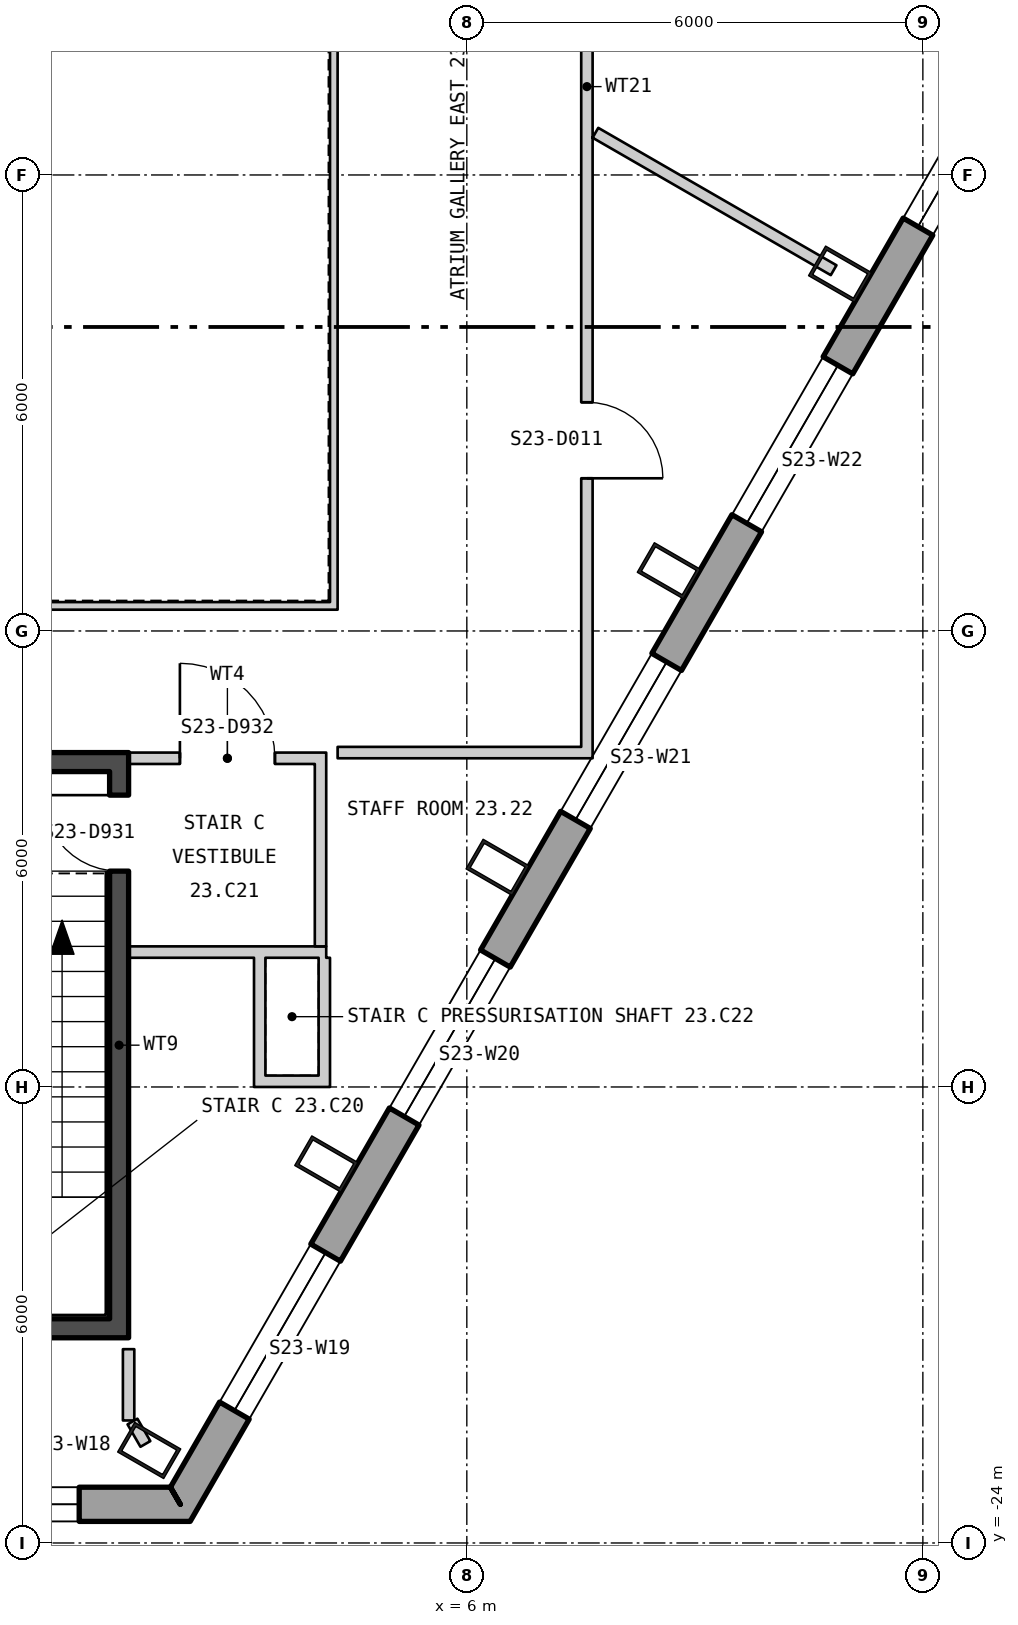
"""IFC4 building model, lengths in metres.
Left out: names, types, materials, properties, quantities, classifications, styles, units other than length and angle.
Written with IfcOpenShell. Run it as: python <this file> out.ifc"""

import sys

from ifc_helpers import new_model, si_unit, direction, frame, frame_2d, origin, origin_2d, place, context, subcontext, project, spatial, polyline, rectangle, hollow_rectangle, outline, extrude, element, fill, save


model = new_model("IFC4")
c1 = context("Model", 3, precision=1e-05, world=origin(), true_north=direction((0.0, 1.0)))
c2 = subcontext(c1, "Body", "Model", "MODEL_VIEW")
j1 = project(units=[si_unit("LENGTHUNIT", "METRE"), si_unit("PLANEANGLEUNIT", "RADIAN")], contexts=[c1])
p1 = place(None, origin())
s1 = spatial("IfcSite", under=j1, at=p1, CompositionType="ELEMENT")
p2 = place(p1, origin())
s2 = spatial("IfcBuilding", under=s1, at=p2, CompositionType="ELEMENT")
p3 = place(p2, frame((0.0, 0.0, 304.2)))
s3 = spatial("IfcBuildingStorey", under=s2, at=p3, CompositionType="ELEMENT", Elevation=304.2)
for number, where, z_axis, x_axis in (
    (1, (1.821, -22.783, 0.0), (0.0, 0.0, 1.0), (0.5, 0.866, 0.0)),
    (2, (4.151, -19.013, 0.0), (0.0, 0.0, 1.0), (0.5, 0.866, 0.0)),
    (3, (6.405, -15.11, 0.0), (0.0, 0.0, 1.0), (0.5, 0.866, 0.0)),
    (4, (8.658, -11.208, 0.0), (0.0, 0.0, 1.0), (0.5, 0.866, 0.0)),
    (5, (10.911, -7.305, 0.0), (0.0, 0.0, 1.0), (0.5, 0.866, 0.0)),
):
    element("IfcColumn", number, at=place(p3, frame(where, z_axis=z_axis, x_axis=x_axis)), inside=s3, PredefinedType="COLUMN", context=c2, shape_type="SweptSolid", body=[
        extrude(hollow_rectangle(XDim=0.45, YDim=0.7, WallThickness=0.04, at=origin_2d()), origin(), (0.0, 0.0, 1.0), 4.2),
    ])
p4 = place(p3, frame((-2.23, -23.491, -0.18), z_axis=(0.0, 0.0, 1.0), x_axis=(1.0, 0.0, 0.0)))
e6 = element("IfcWall", 6, at=p4, inside=s3, PredefinedType="SOLIDWALL", context=c2, shape_type="SweptSolid", body=[
    extrude(outline(polyline([(-0.13, -0.225), (4.59, -0.225), (4.33, 0.225), (0.13, 0.225), (-0.13, -0.225)])), origin(), (0.0, 0.0, 1.0), 3.98),
])
p5 = place(p4, frame((1.33, 0.0, 1.08)))
e7 = element("IfcOpeningElement", 7, at=p5, cuts=e6, PredefinedType="OPENING", context=c2, shape_type="SweptSolid", body=[
    extrude(rectangle(XDim=1.8, YDim=2.3, at=frame_2d((0.9, 1.15))), frame((0.0, 0.235, 0.0), z_axis=(0.0, -1.0, 0.0), x_axis=(1.0, 0.0, 0.0)), (0.0, 0.0, 1.0), 0.47),
])
p6 = place(p3, frame((2.23, -23.491, -0.18), z_axis=(0.0, 0.0, 1.0), x_axis=(0.500000141277, 0.866025322218, 0.0)))
e8 = element("IfcWall", 8, at=p6, inside=s3, PredefinedType="SOLIDWALL", context=c2, shape_type="SweptSolid", body=[
    extrude(outline(polyline([(-0.13, -0.225), (45.86, -0.225), (45.6, 0.225), (0.13, 0.225), (-0.13, -0.225)])), origin(), (0.0, 0.0, 1.0), 3.98),
])
p7 = place(p6, frame((1.424, 0.0, 1.08)))
e9 = element("IfcOpeningElement", 9, at=p7, cuts=e8, PredefinedType="OPENING", context=c2, shape_type="SweptSolid", body=[
    extrude(rectangle(XDim=2.4, YDim=2.3, at=frame_2d((1.2, 1.15))), frame((0.0, 0.235, 0.0), z_axis=(0.0, -1.0, 0.0), x_axis=(1.0, 0.0, 0.0)), (0.0, 0.0, 1.0), 0.47),
])
p8 = place(p6, frame((5.892, 0.0, 1.08)))
e10 = element("IfcOpeningElement", 10, at=p8, cuts=e8, PredefinedType="OPENING", context=c2, shape_type="SweptSolid", body=[
    extrude(rectangle(XDim=2.4, YDim=2.3, at=frame_2d((1.2, 1.15))), frame((0.0, 0.235, 0.0), z_axis=(0.0, -1.0, 0.0), x_axis=(1.0, 0.0, 0.0)), (0.0, 0.0, 1.0), 0.47),
])
p9 = place(p6, frame((10.399, 0.0, 1.08)))
e11 = element("IfcOpeningElement", 11, at=p9, cuts=e8, PredefinedType="OPENING", context=c2, shape_type="SweptSolid", body=[
    extrude(rectangle(XDim=2.4, YDim=2.3, at=frame_2d((1.2, 1.15))), frame((0.0, 0.235, 0.0), z_axis=(0.0, -1.0, 0.0), x_axis=(1.0, 0.0, 0.0)), (0.0, 0.0, 1.0), 0.47),
])
p10 = place(p6, frame((14.905, 0.0, 1.08)))
e12 = element("IfcOpeningElement", 12, at=p10, cuts=e8, PredefinedType="OPENING", context=c2, shape_type="SweptSolid", body=[
    extrude(rectangle(XDim=2.4, YDim=2.3, at=frame_2d((1.2, 1.15))), frame((0.0, 0.235, 0.0), z_axis=(0.0, -1.0, 0.0), x_axis=(1.0, 0.0, 0.0)), (0.0, 0.0, 1.0), 0.47),
])
p11 = place(p6, frame((19.412, 0.0, 1.08)))
e13 = element("IfcOpeningElement", 13, at=p11, cuts=e8, PredefinedType="OPENING", context=c2, shape_type="SweptSolid", body=[
    extrude(rectangle(XDim=2.4, YDim=2.3, at=frame_2d((1.2, 1.15))), frame((0.0, 0.235, 0.0), z_axis=(0.0, -1.0, 0.0), x_axis=(1.0, 0.0, 0.0)), (0.0, 0.0, 1.0), 0.47),
])
p12 = place(p6, frame((23.918, 0.0, 1.08)))
e14 = element("IfcOpeningElement", 14, at=p12, cuts=e8, PredefinedType="OPENING", context=c2, shape_type="SweptSolid", body=[
    extrude(rectangle(XDim=2.4, YDim=2.3, at=frame_2d((1.2, 1.15))), frame((0.0, 0.235, 0.0), z_axis=(0.0, -1.0, 0.0), x_axis=(1.0, 0.0, 0.0)), (0.0, 0.0, 1.0), 0.47),
])
p13 = place(p6, frame((28.425, 0.0, 1.08)))
e15 = element("IfcOpeningElement", 15, at=p13, cuts=e8, PredefinedType="OPENING", context=c2, shape_type="SweptSolid", body=[
    extrude(rectangle(XDim=2.4, YDim=2.3, at=frame_2d((1.2, 1.15))), frame((0.0, 0.235, 0.0), z_axis=(0.0, -1.0, 0.0), x_axis=(1.0, 0.0, 0.0)), (0.0, 0.0, 1.0), 0.47),
])
p14 = place(p6, frame((32.932, 0.0, 1.08)))
e16 = element("IfcOpeningElement", 16, at=p14, cuts=e8, PredefinedType="OPENING", context=c2, shape_type="SweptSolid", body=[
    extrude(rectangle(XDim=2.4, YDim=2.3, at=frame_2d((1.2, 1.15))), frame((0.0, 0.235, 0.0), z_axis=(0.0, -1.0, 0.0), x_axis=(1.0, 0.0, 0.0)), (0.0, 0.0, 1.0), 0.47),
])
p15 = place(p6, frame((37.438, 0.0, 1.08)))
e17 = element("IfcOpeningElement", 17, at=p15, cuts=e8, PredefinedType="OPENING", context=c2, shape_type="SweptSolid", body=[
    extrude(rectangle(XDim=2.4, YDim=2.3, at=frame_2d((1.2, 1.15))), frame((0.0, 0.235, 0.0), z_axis=(0.0, -1.0, 0.0), x_axis=(1.0, 0.0, 0.0)), (0.0, 0.0, 1.0), 0.47),
])
p16 = place(p6, frame((41.907, 0.0, 1.08)))
e18 = element("IfcOpeningElement", 18, at=p16, cuts=e8, PredefinedType="OPENING", context=c2, shape_type="SweptSolid", body=[
    extrude(rectangle(XDim=2.4, YDim=2.3, at=frame_2d((1.2, 1.15))), frame((0.0, 0.235, 0.0), z_axis=(0.0, -1.0, 0.0), x_axis=(1.0, 0.0, 0.0)), (0.0, 0.0, 1.0), 0.47),
])
p17 = place(p3, frame((-4.3, -11.67, 0.0), z_axis=(0.0, 0.0, 1.0), x_axis=(1.0, 0.0, 0.0)))
e19 = element("IfcWall", 19, at=p17, inside=s3, PredefinedType="PARTITIONING", context=c2, shape_type="SweptSolid", body=[
    extrude(rectangle(XDim=8.6, YDim=0.1, at=frame_2d((4.3, 0.0))), origin(), (0.0, 0.0, 1.0), 4.0),
])
p18 = place(p3, frame((4.25, -11.62, 0.0), z_axis=(0.0, 0.0, 1.0), x_axis=(0.0, 1.0, 0.0)))
e20 = element("IfcWall", 20, at=p18, inside=s3, PredefinedType="PARTITIONING", context=c2, shape_type="SweptSolid", body=[
    extrude(rectangle(XDim=8.04, YDim=0.1, at=frame_2d((4.02, 0.0))), origin(), (0.0, 0.0, 1.0), 4.0),
])
p19 = place(p3, frame((1.425, -21.05, 0.0), z_axis=(0.0, 0.0, 1.0), x_axis=(0.0, 1.0, 0.0)))
e21 = element("IfcWall", 21, at=p19, inside=s3, PredefinedType="SHEAR", context=c2, shape_type="SweptSolid", body=[
    extrude(rectangle(XDim=7.2, YDim=0.25, at=frame_2d((3.6, 0.0))), origin(), (0.0, 0.0, 1.0), 4.0),
])
p20 = place(p19, frame((5.89, 0.0, 0.0)))
e22 = element("IfcOpeningElement", 22, at=p20, cuts=e21, PredefinedType="OPENING", context=c2, shape_type="SweptSolid", body=[
    extrude(rectangle(XDim=1.0, YDim=2.1, at=frame_2d((0.5, 1.05))), frame((0.0, 0.135, 0.0), z_axis=(0.0, -1.0, 0.0), x_axis=(1.0, 0.0, 0.0)), (0.0, 0.0, 1.0), 0.27),
])
for number, where, z_axis, x_axis in (
    (23, (-1.55, -21.175, 0.0), (0.0, 0.0, 1.0), (1.0, 0.0, 0.0)),
    (24, (-1.55, -13.725, 0.0), (0.0, 0.0, 1.0), (1.0, 0.0, 0.0)),
):
    element("IfcWall", number, at=place(p3, frame(where, z_axis=z_axis, x_axis=x_axis)), inside=s3, PredefinedType="SHEAR", context=c2, shape_type="SweptSolid", body=[
        extrude(rectangle(XDim=3.1, YDim=0.25, at=frame_2d((1.55, 0.0))), origin(), (0.0, 0.0, 1.0), 4.0),
    ])
p21 = place(p3, frame((1.55, -16.225, 0.0), z_axis=(0.0, 0.0, 1.0), x_axis=(1.0, 0.0, 0.0)))
e25 = element("IfcWall", 25, at=p21, inside=s3, PredefinedType="PARTITIONING", context=c2, shape_type="SweptSolid", body=[
    extrude(rectangle(XDim=2.6, YDim=0.15, at=frame_2d((1.3, 0.0))), origin(), (0.0, 0.0, 1.0), 4.0),
])
p22 = place(p3, frame((4.075, -16.15, 0.0), z_axis=(0.0, 0.0, 1.0), x_axis=(0.0, 1.0, 0.0)))
e26 = element("IfcWall", 26, at=p22, inside=s3, PredefinedType="PARTITIONING", context=c2, shape_type="SweptSolid", body=[
    extrude(rectangle(XDim=2.4, YDim=0.15, at=frame_2d((1.2, 0.0))), origin(), (0.0, 0.0, 1.0), 4.0),
])
p23 = place(p3, frame((1.55, -13.675, 0.0), z_axis=(0.0, 0.0, 1.0), x_axis=(1.0, 0.0, 0.0)))
e27 = element("IfcWall", 27, at=p23, inside=s3, PredefinedType="PARTITIONING", context=c2, shape_type="SweptSolid", body=[
    extrude(rectangle(XDim=2.6, YDim=0.15, at=frame_2d((1.3, 0.0))), origin(), (0.0, 0.0, 1.0), 3.186),
])
p24 = place(p23, frame((0.675, 0.0, 0.0)))
e28 = element("IfcOpeningElement", 28, at=p24, cuts=e27, PredefinedType="OPENING", context=c2, shape_type="SweptSolid", body=[
    extrude(rectangle(XDim=1.25, YDim=2.1, at=frame_2d((0.625, 1.05))), frame((0.0, 0.085, 0.0), z_axis=(0.0, -1.0, 0.0), x_axis=(1.0, 0.0, 0.0)), (0.0, 0.0, 1.0), 0.17),
])
p25 = place(p3, frame((3.275, -18.0, 0.0), z_axis=(0.0, 0.0, 1.0), x_axis=(0.0, 1.0, 0.0)))
e29 = element("IfcWall", 29, at=p25, inside=s3, PredefinedType="PARTITIONING", context=c2, shape_type="SweptSolid", body=[
    extrude(rectangle(XDim=1.7, YDim=0.15, at=frame_2d((0.85, 0.0))), origin(), (0.0, 0.0, 1.0), 3.55),
])
p26 = place(p3, frame((3.35, -17.925, 0.0), z_axis=(0.0, 0.0, 1.0), x_axis=(1.0, 0.0, 0.0)))
e30 = element("IfcWall", 30, at=p26, inside=s3, PredefinedType="PARTITIONING", context=c2, shape_type="SweptSolid", body=[
    extrude(rectangle(XDim=0.7, YDim=0.15, at=frame_2d((0.35, 0.0))), origin(), (0.0, 0.0, 1.0), 4.0),
])
p27 = place(p3, frame((4.125, -18.0, 0.0), z_axis=(0.0, 0.0, 1.0), x_axis=(0.0, 1.0, 0.0)))
e31 = element("IfcWall", 31, at=p27, inside=s3, PredefinedType="PARTITIONING", context=c2, shape_type="SweptSolid", body=[
    extrude(rectangle(XDim=1.7, YDim=0.15, at=frame_2d((0.85, 0.0))), origin(), (0.0, 0.0, 1.0), 4.0),
])
p28 = place(p3, frame((1.55, -22.388, 0.0), z_axis=(0.0, 0.0, 1.0), x_axis=(0.0, 1.0, 0.0)))
e32 = element("IfcWall", 32, at=p28, inside=s3, PredefinedType="PARTITIONING", context=c2, shape_type="SweptSolid", body=[
    extrude(rectangle(XDim=0.938, YDim=0.15, at=frame_2d((0.469, 0.0))), origin(), (0.0, 0.0, 1.0), 4.0),
])
p29 = place(p3, frame((1.601, -22.402, 0.0), z_axis=(0.0, 0.0, 1.0), x_axis=(0.499298623879, -0.866429964967, 0.0)))
e33 = element("IfcWall", 33, at=p29, inside=s3, PredefinedType="PARTITIONING", context=c2, shape_type="SweptSolid", body=[
    extrude(rectangle(XDim=0.341, YDim=0.15, at=frame_2d((0.17, 0.0))), origin(), (0.0, 0.0, 1.0), 4.0),
])
p30 = place(p3, frame((4.3, -13.6, 0.0), z_axis=(0.0, 0.0, 1.0), x_axis=(1.0, 0.0, 0.0)))
e34 = element("IfcWall", 34, at=p30, inside=s3, PredefinedType="PARTITIONING", context=c2, shape_type="SweptSolid", body=[
    extrude(rectangle(XDim=2.775, YDim=0.15, at=frame_2d((1.387, 0.0))), origin(), (0.0, 0.0, 1.0), 3.186),
])
p31 = place(p3, frame((7.075, -13.6, 0.0), z_axis=(0.0, 0.0, 1.0), x_axis=(1.0, 0.0, 0.0)))
e35 = element("IfcWall", 35, at=p31, inside=s3, PredefinedType="PARTITIONING", context=c2, shape_type="SweptSolid", body=[
    extrude(rectangle(XDim=0.43, YDim=0.15, at=frame_2d((0.215, 0.0))), origin(), (0.0, 0.0, 1.0), 4.0),
])
p32 = place(p3, frame((7.58, -13.675, 0.0), z_axis=(0.0, 0.0, 1.0), x_axis=(0.0, 1.0, 0.0)))
e36 = element("IfcWall", 36, at=p32, inside=s3, PredefinedType="PARTITIONING", context=c2, shape_type="SweptSolid", body=[
    extrude(rectangle(XDim=17.675, YDim=0.15, at=frame_2d((8.838, 0.0))), origin(), (0.0, 0.0, 1.0), 4.0),
])
p33 = place(p32, frame((3.684, 0.0, 0.0)))
e37 = element("IfcOpeningElement", 37, at=p33, cuts=e36, PredefinedType="OPENING", context=c2, shape_type="SweptSolid", body=[
    extrude(rectangle(XDim=1.0, YDim=2.1, at=frame_2d((0.5, 1.05))), frame((0.0, 0.085, 0.0), z_axis=(0.0, -1.0, 0.0), x_axis=(1.0, 0.0, 0.0)), (0.0, 0.0, 1.0), 0.17),
])
p34 = place(p32, frame((16.275, 0.0, 0.0)))
e38 = element("IfcOpeningElement", 38, at=p34, cuts=e36, PredefinedType="OPENING", context=c2, shape_type="SweptSolid", body=[
    extrude(rectangle(XDim=1.0, YDim=2.1, at=frame_2d((0.5, 1.05))), frame((0.0, 0.085, 0.0), z_axis=(0.0, -1.0, 0.0), x_axis=(1.0, 0.0, 0.0)), (0.0, 0.0, 1.0), 0.17),
])
p35 = place(p3, frame((7.692, -5.445, 0.0), z_axis=(0.0, 0.0, 1.0), x_axis=(0.866194788555, -0.49970650214, 0.0)))
e39 = element("IfcWall", 39, at=p35, inside=s3, PredefinedType="PARTITIONING", context=c2, shape_type="SweptSolid", body=[
    extrude(rectangle(XDim=3.618, YDim=0.15, at=frame_2d((1.809, 0.0))), origin(), (0.0, 0.0, 1.0), 4.0),
])
p36 = place(p5, origin())
e40 = element("IfcWindow", 40, at=p36, inside=s3, PartitioningType="SINGLE_PANEL", PredefinedType="WINDOW", context=c2, shape_type="SweptSolid", body=[
    extrude(rectangle(XDim=1.8, YDim=2.3, at=frame_2d((0.9, 1.15))), frame((0.0, 0.105, 0.0), z_axis=(0.0, -1.0, 0.0), x_axis=(1.0, 0.0, 0.0)), (0.0, 0.0, 1.0), 0.06),
])
fill(e7, e40)
p37 = place(p7, origin())
e41 = element("IfcWindow", 41, at=p37, inside=s3, PartitioningType="SINGLE_PANEL", PredefinedType="WINDOW", context=c2, shape_type="SweptSolid", body=[
    extrude(rectangle(XDim=2.4, YDim=2.3, at=frame_2d((1.2, 1.15))), frame((0.0, 0.105, 0.0), z_axis=(0.0, -1.0, 0.0), x_axis=(1.0, 0.0, 0.0)), (0.0, 0.0, 1.0), 0.06),
])
fill(e9, e41)
p38 = place(p8, origin())
e42 = element("IfcWindow", 42, at=p38, inside=s3, PartitioningType="SINGLE_PANEL", PredefinedType="WINDOW", context=c2, shape_type="SweptSolid", body=[
    extrude(rectangle(XDim=2.4, YDim=2.3, at=frame_2d((1.2, 1.15))), frame((0.0, 0.105, 0.0), z_axis=(0.0, -1.0, 0.0), x_axis=(1.0, 0.0, 0.0)), (0.0, 0.0, 1.0), 0.06),
])
fill(e10, e42)
p39 = place(p9, origin())
e43 = element("IfcWindow", 43, at=p39, inside=s3, PartitioningType="SINGLE_PANEL", PredefinedType="WINDOW", context=c2, shape_type="SweptSolid", body=[
    extrude(rectangle(XDim=2.4, YDim=2.3, at=frame_2d((1.2, 1.15))), frame((0.0, 0.105, 0.0), z_axis=(0.0, -1.0, 0.0), x_axis=(1.0, 0.0, 0.0)), (0.0, 0.0, 1.0), 0.06),
])
fill(e11, e43)
p40 = place(p10, origin())
e44 = element("IfcWindow", 44, at=p40, inside=s3, PartitioningType="SINGLE_PANEL", PredefinedType="WINDOW", context=c2, shape_type="SweptSolid", body=[
    extrude(rectangle(XDim=2.4, YDim=2.3, at=frame_2d((1.2, 1.15))), frame((0.0, 0.105, 0.0), z_axis=(0.0, -1.0, 0.0), x_axis=(1.0, 0.0, 0.0)), (0.0, 0.0, 1.0), 0.06),
])
fill(e12, e44)
p41 = place(p11, origin())
e45 = element("IfcWindow", 45, at=p41, inside=s3, PartitioningType="SINGLE_PANEL", PredefinedType="WINDOW", context=c2, shape_type="SweptSolid", body=[
    extrude(rectangle(XDim=2.4, YDim=2.3, at=frame_2d((1.2, 1.15))), frame((0.0, 0.105, 0.0), z_axis=(0.0, -1.0, 0.0), x_axis=(1.0, 0.0, 0.0)), (0.0, 0.0, 1.0), 0.06),
])
fill(e13, e45)
p42 = place(p20, origin())
e46 = element("IfcDoor", 46, at=p42, inside=s3, OperationType="SINGLE_SWING_LEFT", PredefinedType="DOOR", context=c2, shape_type="SweptSolid", body=[
    extrude(rectangle(XDim=1.0, YDim=2.1, at=frame_2d((0.5, 1.05))), frame((0.0, 0.025, 0.0), z_axis=(0.0, -1.0, 0.0), x_axis=(1.0, 0.0, 0.0)), (0.0, 0.0, 1.0), 0.05),
])
fill(e22, e46)
p43 = place(p24, origin())
e47 = element("IfcDoor", 47, at=p43, inside=s3, OperationType="SINGLE_SWING_RIGHT", PredefinedType="DOOR", context=c2, shape_type="SweptSolid", body=[
    extrude(rectangle(XDim=1.25, YDim=2.1, at=frame_2d((0.625, 1.05))), frame((0.0, 0.025, 0.0), z_axis=(0.0, -1.0, 0.0), x_axis=(1.0, 0.0, 0.0)), (0.0, 0.0, 1.0), 0.05),
])
fill(e28, e47)
p44 = place(p33, origin())
e48 = element("IfcDoor", 48, at=p44, inside=s3, OperationType="SINGLE_SWING_LEFT", PredefinedType="DOOR", context=c2, shape_type="SweptSolid", body=[
    extrude(rectangle(XDim=1.0, YDim=2.1, at=frame_2d((0.5, 1.05))), frame((0.0, 0.025, 0.0), z_axis=(0.0, -1.0, 0.0), x_axis=(1.0, 0.0, 0.0)), (0.0, 0.0, 1.0), 0.05),
])
fill(e37, e48)
save(model, sys.argv[1])
